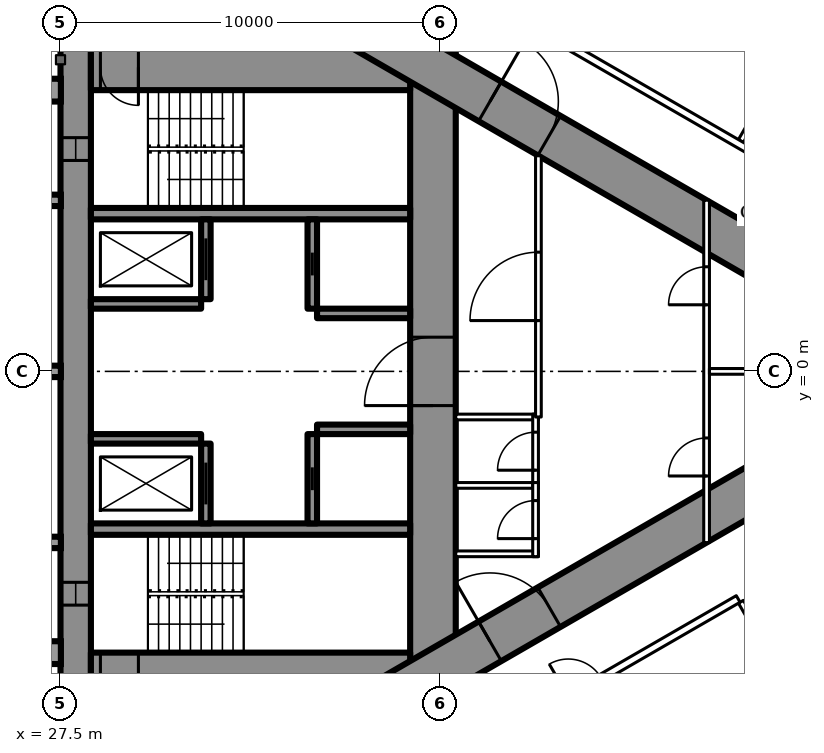
"""IFC4 building model, lengths in metres.
Left out: names, types, materials, properties, quantities, classifications, styles, units other than length and angle.
Written with IfcOpenShell. Run it as: python <this file> out.ifc"""

import sys

from ifc_helpers import new_model, si_unit, direction, frame, frame_2d, origin, place, context, subcontext, project, spatial, rectangle, extrude, element, fill, save


model = new_model("IFC4")
c1 = context("Model", 3, precision=1e-05, world=origin(), true_north=direction((0.0, 1.0)))
c2 = subcontext(c1, "Body", "Model", "MODEL_VIEW")
j1 = project(units=[si_unit("LENGTHUNIT", "METRE"), si_unit("PLANEANGLEUNIT", "RADIAN")], contexts=[c1])
p1 = place(None, origin())
s1 = spatial("IfcSite", under=j1, at=p1, CompositionType="ELEMENT")
p2 = place(p1, origin())
s2 = spatial("IfcBuilding", under=s1, at=p2, CompositionType="ELEMENT")
p3 = place(p2, frame((0.0, 0.0, 18.0)))
s3 = spatial("IfcBuildingStorey", under=s2, at=p3, CompositionType="ELEMENT", Elevation=18.0)
p4 = place(p3, frame((27.9, -8.6, 0.0), z_axis=(0.0, 0.0, 1.0), x_axis=(0.0, 1.0, 0.0)))
e1 = element("IfcWall", 1, at=p4, inside=s3, PredefinedType="SHEAR", context=c2, shape_type="SweptSolid", body=[
    extrude(rectangle(XDim=17.2, YDim=0.8, at=frame_2d((8.6, 0.0))), origin(), (0.0, 0.0, 1.0), 3.5),
])
p5 = place(p4, frame((2.45, 0.0, 0.6)))
e2 = element("IfcOpeningElement", 2, at=p5, cuts=e1, PredefinedType="OPENING", context=c2, shape_type="SweptSolid", body=[
    extrude(rectangle(XDim=0.6, YDim=2.1, at=frame_2d((0.3, 1.05))), frame((0.0, 0.41, 0.0), z_axis=(0.0, -1.0, 0.0), x_axis=(1.0, 0.0, 0.0)), (0.0, 0.0, 1.0), 0.82),
])
p6 = place(p4, frame((14.15, 0.0, 0.6)))
e3 = element("IfcOpeningElement", 3, at=p6, cuts=e1, PredefinedType="OPENING", context=c2, shape_type="SweptSolid", body=[
    extrude(rectangle(XDim=0.6, YDim=2.1, at=frame_2d((0.3, 1.05))), frame((0.0, 0.41, 0.0), z_axis=(0.0, -1.0, 0.0), x_axis=(1.0, 0.0, 0.0)), (0.0, 0.0, 1.0), 0.82),
])
p7 = place(p3, frame((37.3, -8.6, 0.0), z_axis=(0.0, 0.0, 1.0), x_axis=(0.0, 1.0, 0.0)))
e4 = element("IfcWall", 4, at=p7, inside=s3, PredefinedType="SHEAR", context=c2, shape_type="SweptSolid", body=[
    extrude(rectangle(XDim=17.2, YDim=1.2, at=frame_2d((8.6, 0.0))), origin(), (0.0, 0.0, 1.0), 3.5),
])
p8 = place(p7, frame((7.7, 0.0, 0.0)))
e5 = element("IfcOpeningElement", 5, at=p8, cuts=e4, PredefinedType="OPENING", context=c2, shape_type="SweptSolid", body=[
    extrude(rectangle(XDim=1.8, YDim=2.2, at=frame_2d((0.9, 1.1))), frame((0.0, 0.61, 0.0), z_axis=(0.0, -1.0, 0.0), x_axis=(1.0, 0.0, 0.0)), (0.0, 0.0, 1.0), 1.22),
])
p9 = place(p3, frame((28.3, -8.0, 0.0), z_axis=(0.0, 0.0, 1.0), x_axis=(1.0, 0.0, 0.0)))
e6 = element("IfcWall", 6, at=p9, inside=s3, PredefinedType="SHEAR", context=c2, shape_type="SweptSolid", body=[
    extrude(rectangle(XDim=8.4, YDim=1.2, at=frame_2d((4.2, 0.0))), origin(), (0.0, 0.0, 1.0), 3.5),
])
p10 = place(p9, frame((0.25, 0.0, 0.0)))
e7 = element("IfcOpeningElement", 7, at=p10, cuts=e6, PredefinedType="OPENING", context=c2, shape_type="SweptSolid", body=[
    extrude(rectangle(XDim=1.0, YDim=2.2, at=frame_2d((0.5, 1.1))), frame((0.0, 0.61, 0.0), z_axis=(0.0, -1.0, 0.0), x_axis=(1.0, 0.0, 0.0)), (0.0, 0.0, 1.0), 1.22),
])
p11 = place(p3, frame((28.3, 8.0, 0.0), z_axis=(0.0, 0.0, 1.0), x_axis=(1.0, 0.0, 0.0)))
e8 = element("IfcWall", 8, at=p11, inside=s3, PredefinedType="SHEAR", context=c2, shape_type="SweptSolid", body=[
    extrude(rectangle(XDim=8.4, YDim=1.2, at=frame_2d((4.2, 0.0))), origin(), (0.0, 0.0, 1.0), 3.5),
])
p12 = place(p11, frame((0.25, 0.0, 0.0)))
e9 = element("IfcOpeningElement", 9, at=p12, cuts=e8, PredefinedType="OPENING", context=c2, shape_type="SweptSolid", body=[
    extrude(rectangle(XDim=1.0, YDim=2.2, at=frame_2d((0.5, 1.1))), frame((0.0, 0.61, 0.0), z_axis=(0.0, -1.0, 0.0), x_axis=(1.0, 0.0, 0.0)), (0.0, 0.0, 1.0), 1.22),
])
for number, where, z_axis, x_axis in (
    (10, (28.3, -4.15, 0.0), (0.0, 0.0, 1.0), (1.0, 0.0, 0.0)),
    (11, (28.3, 4.15, 0.0), (0.0, 0.0, 1.0), (1.0, 0.0, 0.0)),
):
    element("IfcWall", number, at=place(p3, frame(where, z_axis=z_axis, x_axis=x_axis)), inside=s3, PredefinedType="SHEAR", context=c2, shape_type="SweptSolid", body=[
        extrude(rectangle(XDim=8.4, YDim=0.3, at=frame_2d((4.2, 0.0))), origin(), (0.0, 0.0, 1.0), 3.5),
    ])
p13 = place(p3, frame((31.325, -4.0, 0.0), z_axis=(0.0, 0.0, 1.0), x_axis=(0.0, 1.0, 0.0)))
e12 = element("IfcWall", 12, at=p13, inside=s3, PredefinedType="SHEAR", context=c2, shape_type="SweptSolid", body=[
    extrude(rectangle(XDim=2.1, YDim=0.25, at=frame_2d((1.05, 0.0))), origin(), (0.0, 0.0, 1.0), 3.5),
])
p14 = place(p13, frame((0.5, 0.0, 0.0)))
e13 = element("IfcOpeningElement", 13, at=p14, cuts=e12, PredefinedType="OPENING", context=c2, shape_type="SweptSolid", body=[
    extrude(rectangle(XDim=1.1, YDim=2.2, at=frame_2d((0.55, 1.1))), frame((0.0, 0.135, 0.0), z_axis=(0.0, -1.0, 0.0), x_axis=(1.0, 0.0, 0.0)), (0.0, 0.0, 1.0), 0.27),
])
p15 = place(p3, frame((34.125, -4.0, 0.0), z_axis=(0.0, 0.0, 1.0), x_axis=(0.0, 1.0, 0.0)))
e14 = element("IfcWall", 14, at=p15, inside=s3, PredefinedType="SHEAR", context=c2, shape_type="SweptSolid", body=[
    extrude(rectangle(XDim=2.35, YDim=0.25, at=frame_2d((1.175, 0.0))), origin(), (0.0, 0.0, 1.0), 3.5),
])
p16 = place(p15, frame((0.875, 0.0, 0.0)))
e15 = element("IfcOpeningElement", 15, at=p16, cuts=e14, PredefinedType="OPENING", context=c2, shape_type="SweptSolid", body=[
    extrude(rectangle(XDim=0.6, YDim=2.0, at=frame_2d((0.3, 1.0))), frame((0.0, 0.135, 0.0), z_axis=(0.0, -1.0, 0.0), x_axis=(1.0, 0.0, 0.0)), (0.0, 0.0, 1.0), 0.27),
])
p17 = place(p3, frame((28.3, -1.775, 0.0), z_axis=(0.0, 0.0, 1.0), x_axis=(1.0, 0.0, 0.0)))
e16 = element("IfcWall", 16, at=p17, inside=s3, PredefinedType="SHEAR", context=c2, shape_type="SweptSolid", body=[
    extrude(rectangle(XDim=2.9, YDim=0.25, at=frame_2d((1.45, 0.0))), origin(), (0.0, 0.0, 1.0), 3.5),
])
p18 = place(p3, frame((34.25, -1.525, 0.0), z_axis=(0.0, 0.0, 1.0), x_axis=(1.0, 0.0, 0.0)))
e17 = element("IfcWall", 17, at=p18, inside=s3, PredefinedType="SHEAR", context=c2, shape_type="SweptSolid", body=[
    extrude(rectangle(XDim=2.45, YDim=0.25, at=frame_2d((1.225, 0.0))), origin(), (0.0, 0.0, 1.0), 3.5),
])
p19 = place(p3, frame((31.325, 1.9, 0.0), z_axis=(0.0, 0.0, 1.0), x_axis=(0.0, 1.0, 0.0)))
e18 = element("IfcWall", 18, at=p19, inside=s3, PredefinedType="SHEAR", context=c2, shape_type="SweptSolid", body=[
    extrude(rectangle(XDim=2.1, YDim=0.25, at=frame_2d((1.05, 0.0))), origin(), (0.0, 0.0, 1.0), 3.5),
])
p20 = place(p19, frame((0.5, 0.0, 0.0)))
e19 = element("IfcOpeningElement", 19, at=p20, cuts=e18, PredefinedType="OPENING", context=c2, shape_type="SweptSolid", body=[
    extrude(rectangle(XDim=1.1, YDim=2.2, at=frame_2d((0.55, 1.1))), frame((0.0, 0.135, 0.0), z_axis=(0.0, -1.0, 0.0), x_axis=(1.0, 0.0, 0.0)), (0.0, 0.0, 1.0), 0.27),
])
p21 = place(p3, frame((34.125, 1.65, 0.0), z_axis=(0.0, 0.0, 1.0), x_axis=(0.0, 1.0, 0.0)))
e20 = element("IfcWall", 20, at=p21, inside=s3, PredefinedType="SHEAR", context=c2, shape_type="SweptSolid", body=[
    extrude(rectangle(XDim=2.35, YDim=0.25, at=frame_2d((1.175, 0.0))), origin(), (0.0, 0.0, 1.0), 3.5),
])
p22 = place(p21, frame((0.875, 0.0, 0.0)))
e21 = element("IfcOpeningElement", 21, at=p22, cuts=e20, PredefinedType="OPENING", context=c2, shape_type="SweptSolid", body=[
    extrude(rectangle(XDim=0.6, YDim=2.0, at=frame_2d((0.3, 1.0))), frame((0.0, 0.135, 0.0), z_axis=(0.0, -1.0, 0.0), x_axis=(1.0, 0.0, 0.0)), (0.0, 0.0, 1.0), 0.27),
])
p23 = place(p3, frame((28.3, 1.775, 0.0), z_axis=(0.0, 0.0, 1.0), x_axis=(1.0, 0.0, 0.0)))
e22 = element("IfcWall", 22, at=p23, inside=s3, PredefinedType="SHEAR", context=c2, shape_type="SweptSolid", body=[
    extrude(rectangle(XDim=2.9, YDim=0.25, at=frame_2d((1.45, 0.0))), origin(), (0.0, 0.0, 1.0), 3.5),
])
p24 = place(p3, frame((34.25, 1.525, 0.0), z_axis=(0.0, 0.0, 1.0), x_axis=(1.0, 0.0, 0.0)))
e23 = element("IfcWall", 23, at=p24, inside=s3, PredefinedType="SHEAR", context=c2, shape_type="SweptSolid", body=[
    extrude(rectangle(XDim=2.45, YDim=0.25, at=frame_2d((1.225, 0.0))), origin(), (0.0, 0.0, 1.0), 3.5),
])
p25 = place(p3, frame((27.2, -13.8, 0.0), z_axis=(0.0, 0.0, 1.0), x_axis=(0.866027159892, 0.499996958321, 0.0)))
e24 = element("IfcWall", 24, at=p25, inside=s3, PredefinedType="SHEAR", context=c2, shape_type="SweptSolid", body=[
    extrude(rectangle(XDim=27.947, YDim=1.2, at=frame_2d((13.973, 0.0))), origin(), (0.0, 0.0, 1.0), 3.5),
])
p26 = place(p25, frame((4.6, 0.0, 0.0)))
e25 = element("IfcOpeningElement", 25, at=p26, cuts=e24, PredefinedType="OPENING", context=c2, shape_type="SweptSolid", body=[
    extrude(rectangle(XDim=1.0, YDim=2.2, at=frame_2d((0.5, 1.1))), frame((0.0, 0.61, 0.0), z_axis=(0.0, -1.0, 0.0), x_axis=(1.0, 0.0, 0.0)), (0.0, 0.0, 1.0), 1.22),
])
p27 = place(p25, frame((13.395, 0.0, 0.0)))
e26 = element("IfcOpeningElement", 26, at=p27, cuts=e24, PredefinedType="OPENING", context=c2, shape_type="SweptSolid", body=[
    extrude(rectangle(XDim=1.8, YDim=2.2, at=frame_2d((0.9, 1.1))), frame((0.0, 0.61, 0.0), z_axis=(0.0, -1.0, 0.0), x_axis=(1.0, 0.0, 0.0)), (0.0, 0.0, 1.0), 1.22),
])
p28 = place(p3, frame((27.2, 13.8, 0.0), z_axis=(0.0, 0.0, 1.0), x_axis=(0.866024515034, -0.500001539357, 0.0)))
e27 = element("IfcWall", 27, at=p28, inside=s3, PredefinedType="SHEAR", context=c2, shape_type="SweptSolid", body=[
    extrude(rectangle(XDim=26.907, YDim=1.2, at=frame_2d((13.454, 0.0))), origin(), (0.0, 0.0, 1.0), 3.5),
])
p29 = place(p28, frame((4.6, 0.0, 0.0)))
e28 = element("IfcOpeningElement", 28, at=p29, cuts=e27, PredefinedType="OPENING", context=c2, shape_type="SweptSolid", body=[
    extrude(rectangle(XDim=1.0, YDim=2.2, at=frame_2d((0.5, 1.1))), frame((0.0, 0.61, 0.0), z_axis=(0.0, -1.0, 0.0), x_axis=(1.0, 0.0, 0.0)), (0.0, 0.0, 1.0), 1.22),
])
p30 = place(p28, frame((13.395, 0.0, 0.0)))
e29 = element("IfcOpeningElement", 29, at=p30, cuts=e27, PredefinedType="OPENING", context=c2, shape_type="SweptSolid", body=[
    extrude(rectangle(XDim=1.8, YDim=2.2, at=frame_2d((0.9, 1.1))), frame((0.0, 0.61, 0.0), z_axis=(0.0, -1.0, 0.0), x_axis=(1.0, 0.0, 0.0)), (0.0, 0.0, 1.0), 1.22),
])
p31 = place(p3, frame((45.403, -6.062, 0.0), z_axis=(0.0, 0.0, 1.0), x_axis=(0.500007077968, -0.866021317279, 0.0)))
e30 = element("IfcWall", 30, at=p31, inside=s3, PredefinedType="PARTITIONING", context=c2, shape_type="SweptSolid", body=[
    extrude(rectangle(XDim=12.721, YDim=0.15, at=frame_2d((6.361, 0.0))), origin(), (0.0, 0.0, 1.0), 3.25),
])
p32 = place(p3, frame((45.403, 6.062, 0.0), z_axis=(0.0, 0.0, 1.0), x_axis=(0.500013434677, 0.866017647131, 0.0)))
e31 = element("IfcWall", 31, at=p32, inside=s3, PredefinedType="PARTITIONING", context=c2, shape_type="SweptSolid", body=[
    extrude(rectangle(XDim=9.902, YDim=0.15, at=frame_2d((4.951, 0.0))), origin(), (0.0, 0.0, 1.0), 2.25),
])
p33 = place(p3, frame((36.834, 10.894, 0.0), z_axis=(0.0, 0.0, 1.0), x_axis=(0.866028157229, -0.499995230863, 0.0)))
e32 = element("IfcWall", 32, at=p33, inside=s3, PredefinedType="PARTITIONING", context=c2, shape_type="SweptSolid", body=[
    extrude(rectangle(XDim=21.667, YDim=0.2, at=frame_2d((10.833, 0.0))), origin(), (0.0, 0.0, 1.0), 3.25),
])
p34 = place(p33, frame((18.885, 0.0, 0.0)))
e33 = element("IfcOpeningElement", 33, at=p34, cuts=e32, PredefinedType="OPENING", context=c2, shape_type="SweptSolid", body=[
    extrude(rectangle(XDim=0.95, YDim=2.2, at=frame_2d((0.475, 1.1))), frame((0.0, 0.11, 0.0), z_axis=(0.0, -1.0, 0.0), x_axis=(1.0, 0.0, 0.0)), (0.0, 0.0, 1.0), 0.22),
])
p35 = place(p33, frame((14.835, 0.0, 0.0)))
e34 = element("IfcOpeningElement", 34, at=p35, cuts=e32, PredefinedType="OPENING", context=c2, shape_type="SweptSolid", body=[
    extrude(rectangle(XDim=0.95, YDim=2.2, at=frame_2d((0.475, 1.1))), frame((0.0, 0.11, 0.0), z_axis=(0.0, -1.0, 0.0), x_axis=(1.0, 0.0, 0.0)), (0.0, 0.0, 1.0), 0.22),
])
p36 = place(p33, frame((12.85, 0.0, 0.0)))
e35 = element("IfcOpeningElement", 35, at=p36, cuts=e32, PredefinedType="OPENING", context=c2, shape_type="SweptSolid", body=[
    extrude(rectangle(XDim=0.95, YDim=2.2, at=frame_2d((0.475, 1.1))), frame((0.0, 0.11, 0.0), z_axis=(0.0, -1.0, 0.0), x_axis=(1.0, 0.0, 0.0)), (0.0, 0.0, 1.0), 0.22),
])
p37 = place(p33, frame((1.542, 0.0, 0.0)))
e36 = element("IfcOpeningElement", 36, at=p37, cuts=e32, PredefinedType="OPENING", context=c2, shape_type="SweptSolid", body=[
    extrude(rectangle(XDim=0.95, YDim=2.2, at=frame_2d((0.475, 1.1))), frame((0.0, 0.11, 0.0), z_axis=(0.0, -1.0, 0.0), x_axis=(1.0, 0.0, 0.0)), (0.0, 0.0, 1.0), 0.22),
])
p38 = place(p3, frame((37.96, -10.243, 0.0), z_axis=(0.0, 0.0, 1.0), x_axis=(0.866024617314, 0.500001362204, 0.0)))
e37 = element("IfcWall", 37, at=p38, inside=s3, PredefinedType="PARTITIONING", context=c2, shape_type="SweptSolid", body=[
    extrude(rectangle(XDim=8.512, YDim=0.2, at=frame_2d((4.256, 0.0))), origin(), (0.0, 0.0, 1.0), 3.25),
])
p39 = place(p38, frame((3.35, 0.0, 0.0)))
e38 = element("IfcOpeningElement", 38, at=p39, cuts=e37, PredefinedType="OPENING", context=c2, shape_type="SweptSolid", body=[
    extrude(rectangle(XDim=1.0, YDim=2.2, at=frame_2d((0.5, 1.1))), frame((0.0, 0.11, 0.0), z_axis=(0.0, -1.0, 0.0), x_axis=(1.0, 0.0, 0.0)), (0.0, 0.0, 1.0), 0.22),
])
for number, where, z_axis, x_axis in (
    (39, (37.9, -1.2, 0.0), (0.0, 0.0, 1.0), (1.0, 0.0, 0.0)),
    (40, (37.9, -3.0, 0.0), (0.0, 0.0, 1.0), (1.0, 0.0, 0.0)),
    (41, (37.9, -4.8, 0.0), (0.0, 0.0, 1.0), (1.0, 0.0, 0.0)),
):
    element("IfcWall", number, at=place(p3, frame(where, z_axis=z_axis, x_axis=x_axis)), inside=s3, PredefinedType="PARTITIONING", context=c2, shape_type="SweptSolid", body=[
        extrude(rectangle(XDim=2.175, YDim=0.15, at=frame_2d((1.087, 0.0))), origin(), (0.0, 0.0, 1.0), 3.25),
    ])
p40 = place(p3, frame((40.0, -3.075, 0.0), z_axis=(0.0, 0.0, 1.0), x_axis=(0.0, 1.0, 0.0)))
e42 = element("IfcWall", 42, at=p40, inside=s3, PredefinedType="PARTITIONING", context=c2, shape_type="SweptSolid", body=[
    extrude(rectangle(XDim=1.95, YDim=0.15, at=frame_2d((0.975, 0.0))), origin(), (0.0, 0.0, 1.0), 3.25),
])
p41 = place(p40, frame((0.475, 0.0, 0.0)))
e43 = element("IfcOpeningElement", 43, at=p41, cuts=e42, PredefinedType="OPENING", context=c2, shape_type="SweptSolid", body=[
    extrude(rectangle(XDim=1.0, YDim=2.2, at=frame_2d((0.5, 1.1))), frame((0.0, 0.085, 0.0), z_axis=(0.0, -1.0, 0.0), x_axis=(1.0, 0.0, 0.0)), (0.0, 0.0, 1.0), 0.17),
])
p42 = place(p3, frame((40.0, -4.875, 0.0), z_axis=(0.0, 0.0, 1.0), x_axis=(0.0, 1.0, 0.0)))
e44 = element("IfcWall", 44, at=p42, inside=s3, PredefinedType="PARTITIONING", context=c2, shape_type="SweptSolid", body=[
    extrude(rectangle(XDim=1.95, YDim=0.15, at=frame_2d((0.975, 0.0))), origin(), (0.0, 0.0, 1.0), 3.25),
])
p43 = place(p42, frame((0.475, 0.0, 0.0)))
e45 = element("IfcOpeningElement", 45, at=p43, cuts=e44, PredefinedType="OPENING", context=c2, shape_type="SweptSolid", body=[
    extrude(rectangle(XDim=1.0, YDim=2.2, at=frame_2d((0.5, 1.1))), frame((0.0, 0.085, 0.0), z_axis=(0.0, -1.0, 0.0), x_axis=(1.0, 0.0, 0.0)), (0.0, 0.0, 1.0), 0.17),
])
p44 = place(p3, frame((40.075, -1.2, 0.0), z_axis=(0.0, 0.0, 1.0), x_axis=(0.0, 1.0, 0.0)))
e46 = element("IfcWall", 46, at=p44, inside=s3, PredefinedType="PARTITIONING", context=c2, shape_type="SweptSolid", body=[
    extrude(rectangle(XDim=6.874, YDim=0.15, at=frame_2d((3.437, 0.0))), origin(), (0.0, 0.0, 1.0), 3.25),
])
p45 = place(p44, frame((2.537, 0.0, 0.0)))
e47 = element("IfcOpeningElement", 47, at=p45, cuts=e46, PredefinedType="OPENING", context=c2, shape_type="SweptSolid", body=[
    extrude(rectangle(XDim=1.8, YDim=2.2, at=frame_2d((0.9, 1.1))), frame((0.0, 0.085, 0.0), z_axis=(0.0, -1.0, 0.0), x_axis=(1.0, 0.0, 0.0)), (0.0, 0.0, 1.0), 0.17),
])
p46 = place(p3, frame((44.5, -4.505, 0.0), z_axis=(0.0, 0.0, 1.0), x_axis=(0.0, 1.0, 0.0)))
e48 = element("IfcWall", 48, at=p46, inside=s3, PredefinedType="PARTITIONING", context=c2, shape_type="SweptSolid", body=[
    extrude(rectangle(XDim=9.009, YDim=0.15, at=frame_2d((4.505, 0.0))), origin(), (0.0, 0.0, 1.0), 2.35),
])
p47 = place(p46, frame((1.752, 0.0, 0.0)))
e49 = element("IfcOpeningElement", 49, at=p47, cuts=e48, PredefinedType="OPENING", context=c2, shape_type="SweptSolid", body=[
    extrude(rectangle(XDim=1.0, YDim=2.2, at=frame_2d((0.5, 1.1))), frame((0.0, 0.085, 0.0), z_axis=(0.0, -1.0, 0.0), x_axis=(1.0, 0.0, 0.0)), (0.0, 0.0, 1.0), 0.17),
])
p48 = place(p46, frame((6.257, 0.0, 0.0)))
e50 = element("IfcOpeningElement", 50, at=p48, cuts=e48, PredefinedType="OPENING", context=c2, shape_type="SweptSolid", body=[
    extrude(rectangle(XDim=1.0, YDim=2.2, at=frame_2d((0.5, 1.1))), frame((0.0, 0.085, 0.0), z_axis=(0.0, -1.0, 0.0), x_axis=(1.0, 0.0, 0.0)), (0.0, 0.0, 1.0), 0.17),
])
p49 = place(p3, frame((44.575, 0.0, 0.0), z_axis=(0.0, 0.0, 1.0), x_axis=(1.0, 0.0, 0.0)))
e51 = element("IfcWall", 51, at=p49, inside=s3, PredefinedType="PARTITIONING", context=c2, shape_type="SweptSolid", body=[
    extrude(rectangle(XDim=7.727, YDim=0.15, at=frame_2d((3.864, 0.0))), origin(), (0.0, 0.0, 1.0), 2.25),
])
p50 = place(p41, origin())
e52 = element("IfcDoor", 52, at=p50, inside=s3, OperationType="SINGLE_SWING_LEFT", PredefinedType="DOOR", context=c2, shape_type="SweptSolid", body=[
    extrude(rectangle(XDim=1.0, YDim=2.2, at=frame_2d((0.5, 1.1))), frame((0.0, 0.025, 0.0), z_axis=(0.0, -1.0, 0.0), x_axis=(1.0, 0.0, 0.0)), (0.0, 0.0, 1.0), 0.05),
])
fill(e43, e52)
p51 = place(p43, origin())
e53 = element("IfcDoor", 53, at=p51, inside=s3, OperationType="SINGLE_SWING_LEFT", PredefinedType="DOOR", context=c2, shape_type="SweptSolid", body=[
    extrude(rectangle(XDim=1.0, YDim=2.2, at=frame_2d((0.5, 1.1))), frame((0.0, 0.025, 0.0), z_axis=(0.0, -1.0, 0.0), x_axis=(1.0, 0.0, 0.0)), (0.0, 0.0, 1.0), 0.05),
])
fill(e45, e53)
p52 = place(p45, origin())
e54 = element("IfcDoor", 54, at=p52, inside=s3, OperationType="DOUBLE_DOOR_SINGLE_SWING", PredefinedType="DOOR", context=c2, shape_type="SweptSolid", body=[
    extrude(rectangle(XDim=1.8, YDim=2.2, at=frame_2d((0.9, 1.1))), frame((0.0, 0.025, 0.0), z_axis=(0.0, -1.0, 0.0), x_axis=(1.0, 0.0, 0.0)), (0.0, 0.0, 1.0), 0.05),
])
fill(e47, e54)
p53 = place(p47, origin())
e55 = element("IfcDoor", 55, at=p53, inside=s3, OperationType="SINGLE_SWING_LEFT", PredefinedType="DOOR", context=c2, shape_type="SweptSolid", body=[
    extrude(rectangle(XDim=1.0, YDim=2.2, at=frame_2d((0.5, 1.1))), frame((0.0, 0.025, 0.0), z_axis=(0.0, -1.0, 0.0), x_axis=(1.0, 0.0, 0.0)), (0.0, 0.0, 1.0), 0.05),
])
fill(e49, e55)
p54 = place(p48, origin())
e56 = element("IfcDoor", 56, at=p54, inside=s3, OperationType="SINGLE_SWING_LEFT", PredefinedType="DOOR", context=c2, shape_type="SweptSolid", body=[
    extrude(rectangle(XDim=1.0, YDim=2.2, at=frame_2d((0.5, 1.1))), frame((0.0, 0.025, 0.0), z_axis=(0.0, -1.0, 0.0), x_axis=(1.0, 0.0, 0.0)), (0.0, 0.0, 1.0), 0.05),
])
fill(e50, e56)
p55 = place(p27, origin())
e57 = element("IfcDoor", 57, at=p55, inside=s3, OperationType="DOUBLE_DOOR_SINGLE_SWING", PredefinedType="DOOR", context=c2, shape_type="SweptSolid", body=[
    extrude(rectangle(XDim=1.8, YDim=2.2, at=frame_2d((0.9, 1.1))), frame((0.0, 0.025, 0.0), z_axis=(0.0, -1.0, 0.0), x_axis=(1.0, 0.0, 0.0)), (0.0, 0.0, 1.0), 0.05),
])
fill(e26, e57)
p56 = place(p30, origin())
e58 = element("IfcDoor", 58, at=p56, inside=s3, OperationType="DOUBLE_DOOR_SINGLE_SWING", PredefinedType="DOOR", context=c2, shape_type="SweptSolid", body=[
    extrude(rectangle(XDim=1.8, YDim=2.2, at=frame_2d((0.9, 1.1))), frame((0.0, 0.025, 0.0), z_axis=(0.0, -1.0, 0.0), x_axis=(1.0, 0.0, 0.0)), (0.0, 0.0, 1.0), 0.05),
])
fill(e29, e58)
p57 = place(p8, origin())
e59 = element("IfcDoor", 59, at=p57, inside=s3, OperationType="DOUBLE_DOOR_SINGLE_SWING", PredefinedType="DOOR", context=c2, shape_type="SweptSolid", body=[
    extrude(rectangle(XDim=1.8, YDim=2.2, at=frame_2d((0.9, 1.1))), frame((0.0, 0.025, 0.0), z_axis=(0.0, -1.0, 0.0), x_axis=(1.0, 0.0, 0.0)), (0.0, 0.0, 1.0), 0.05),
])
fill(e5, e59)
p58 = place(p12, origin())
e60 = element("IfcDoor", 60, at=p58, inside=s3, OperationType="SINGLE_SWING_RIGHT", PredefinedType="DOOR", context=c2, shape_type="SweptSolid", body=[
    extrude(rectangle(XDim=1.0, YDim=2.2, at=frame_2d((0.5, 1.1))), frame((0.0, 0.025, 0.0), z_axis=(0.0, -1.0, 0.0), x_axis=(1.0, 0.0, 0.0)), (0.0, 0.0, 1.0), 0.05),
])
fill(e9, e60)
p59 = place(p14, origin())
e61 = element("IfcDoor", 61, at=p59, inside=s3, OperationType="SLIDING_TO_LEFT", PredefinedType="USERDEFINED", context=c2, shape_type="SweptSolid", body=[
    extrude(rectangle(XDim=1.1, YDim=2.2, at=frame_2d((0.55, 1.1))), frame((0.0, 0.025, 0.0), z_axis=(0.0, -1.0, 0.0), x_axis=(1.0, 0.0, 0.0)), (0.0, 0.0, 1.0), 0.05),
])
fill(e13, e61)
p60 = place(p20, origin())
e62 = element("IfcDoor", 62, at=p60, inside=s3, OperationType="SLIDING_TO_LEFT", PredefinedType="USERDEFINED", context=c2, shape_type="SweptSolid", body=[
    extrude(rectangle(XDim=1.1, YDim=2.2, at=frame_2d((0.55, 1.1))), frame((0.0, 0.025, 0.0), z_axis=(0.0, -1.0, 0.0), x_axis=(1.0, 0.0, 0.0)), (0.0, 0.0, 1.0), 0.05),
])
fill(e19, e62)
p61 = place(p16, origin())
e63 = element("IfcDoor", 63, at=p61, inside=s3, OperationType="SLIDING_TO_LEFT", PredefinedType="DOOR", context=c2, shape_type="SweptSolid", body=[
    extrude(rectangle(XDim=0.6, YDim=2.0, at=frame_2d((0.3, 1.0))), frame((0.0, 0.025, 0.0), z_axis=(0.0, -1.0, 0.0), x_axis=(1.0, 0.0, 0.0)), (0.0, 0.0, 1.0), 0.05),
])
fill(e15, e63)
p62 = place(p22, origin())
e64 = element("IfcDoor", 64, at=p62, inside=s3, OperationType="SLIDING_TO_LEFT", PredefinedType="DOOR", context=c2, shape_type="SweptSolid", body=[
    extrude(rectangle(XDim=0.6, YDim=2.0, at=frame_2d((0.3, 1.0))), frame((0.0, 0.025, 0.0), z_axis=(0.0, -1.0, 0.0), x_axis=(1.0, 0.0, 0.0)), (0.0, 0.0, 1.0), 0.05),
])
fill(e21, e64)
p63 = place(p5, origin())
e65 = element("IfcWindow", 65, at=p63, inside=s3, PartitioningType="SINGLE_PANEL", PredefinedType="WINDOW", context=c2, shape_type="SweptSolid", body=[
    extrude(rectangle(XDim=0.6, YDim=2.1, at=frame_2d((0.3, 1.05))), frame((0.0, 0.03, 0.0), z_axis=(0.0, -1.0, 0.0), x_axis=(1.0, 0.0, 0.0)), (0.0, 0.0, 1.0), 0.06),
])
fill(e2, e65)
p64 = place(p6, origin())
e66 = element("IfcWindow", 66, at=p64, inside=s3, PartitioningType="SINGLE_PANEL", PredefinedType="WINDOW", context=c2, shape_type="SweptSolid", body=[
    extrude(rectangle(XDim=0.6, YDim=2.1, at=frame_2d((0.3, 1.05))), frame((0.0, 0.03, 0.0), z_axis=(0.0, -1.0, 0.0), x_axis=(1.0, 0.0, 0.0)), (0.0, 0.0, 1.0), 0.06),
])
fill(e3, e66)
save(model, sys.argv[1])
